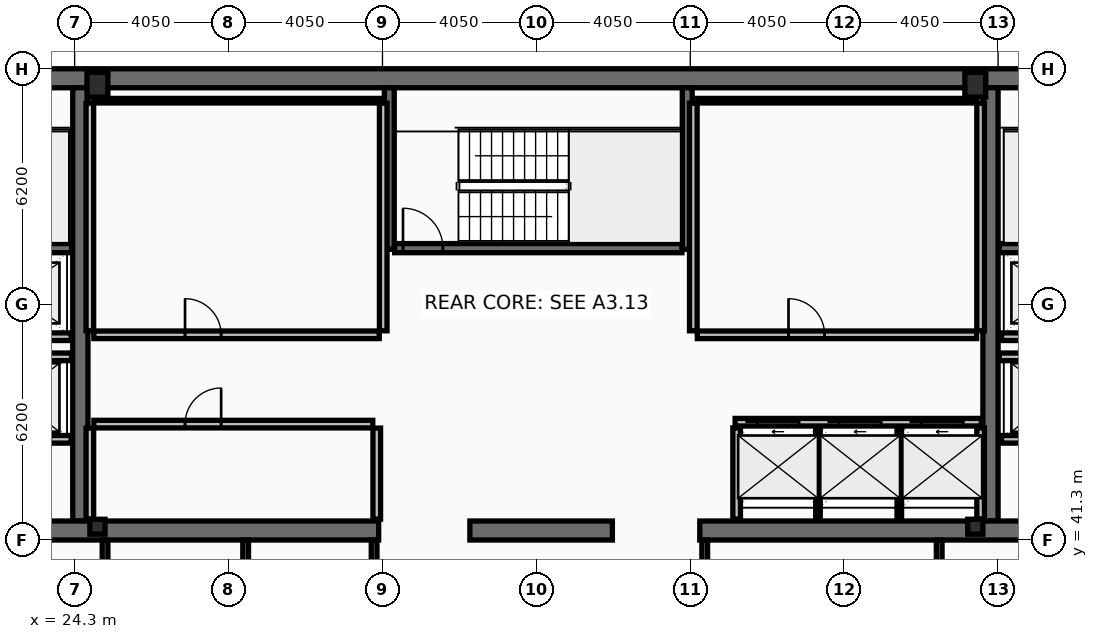
"""IFC4 building model, lengths in metres.
Left out: names, types, materials, properties, quantities, classifications, styles, units other than length and angle.
Written with IfcOpenShell. Run it as: python <this file> out.ifc"""

import sys

from ifc_helpers import new_model, si_unit, direction, frame, frame_2d, origin, origin_2d, place, context, subcontext, project, spatial, rectangle, hollow_rectangle, i_section, extrude, element, fill, save


model = new_model("IFC4")
c1 = context("Model", 3, precision=1e-05, world=origin(), true_north=direction((0.0, 1.0)))
c2 = subcontext(c1, "Body", "Model", "MODEL_VIEW")
j1 = project(units=[si_unit("LENGTHUNIT", "METRE"), si_unit("PLANEANGLEUNIT", "RADIAN")], contexts=[c1])
p1 = place(None, origin())
s1 = spatial("IfcSite", under=j1, at=p1, CompositionType="ELEMENT")
p2 = place(p1, origin())
s2 = spatial("IfcBuilding", under=s1, at=p2, CompositionType="ELEMENT")
p3 = place(p2, frame((0.0, 0.0, 321.8)))
s3 = spatial("IfcBuildingStorey", under=s2, at=p3, CompositionType="ELEMENT", Elevation=321.8)
p4 = place(p3, frame((16.2, 53.45, 0.0), z_axis=(0.0, 0.0, 1.0), x_axis=(1.0, 0.0, 0.0)))
e1 = element("IfcWall", 1, at=p4, inside=s3, PredefinedType="SHEAR", context=c2, shape_type="SweptSolid", body=[
    extrude(rectangle(XDim=40.5, YDim=0.5, at=frame_2d((20.25, 0.0))), origin(), (0.0, 0.0, 1.0), 3.44),
])
for number, where, z_axis, x_axis in (
    (2, (24.45, 41.8, 0.0), (0.0, 0.0, 1.0), (0.0, 1.0, 0.0)),
    (3, (48.4, 41.8, 0.0), (0.0, 0.0, 1.0), (0.0, 1.0, 0.0)),
):
    element("IfcWall", number, at=place(p3, frame(where, z_axis=z_axis, x_axis=x_axis)), inside=s3, PredefinedType="SHEAR", context=c2, shape_type="SweptSolid", body=[
        extrude(rectangle(XDim=11.4, YDim=0.4, at=frame_2d((5.7, 0.0))), origin(), (0.0, 0.0, 1.0), 3.44),
    ])
p5 = place(p3, frame((32.3, 41.55, 0.0), z_axis=(0.0, 0.0, 1.0), x_axis=(-1.0, 0.0, 0.0)))
e4 = element("IfcWall", 4, at=p5, inside=s3, PredefinedType="SHEAR", context=c2, shape_type="SweptSolid", body=[
    extrude(rectangle(XDim=11.45, YDim=0.5, at=frame_2d((5.725, 0.0))), origin(), (0.0, 0.0, 1.0), 3.44),
])
p6 = place(p3, frame((38.45, 41.55, 0.0), z_axis=(0.0, 0.0, 1.0), x_axis=(-1.0, 0.0, 0.0)))
e5 = element("IfcWall", 5, at=p6, inside=s3, PredefinedType="SHEAR", context=c2, shape_type="SweptSolid", body=[
    extrude(rectangle(XDim=3.75, YDim=0.5, at=frame_2d((1.875, 0.0))), origin(), (0.0, 0.0, 1.0), 3.44),
])
p7 = place(p3, frame((52.05, 41.55, 0.0), z_axis=(0.0, 0.0, 1.0), x_axis=(-1.0, 0.0, 0.0)))
e6 = element("IfcWall", 6, at=p7, inside=s3, PredefinedType="SHEAR", context=c2, shape_type="SweptSolid", body=[
    extrude(rectangle(XDim=11.3, YDim=0.5, at=frame_2d((5.65, 0.0))), origin(), (0.0, 0.0, 1.0), 3.44),
])
for number, where, z_axis, x_axis in (
    (7, (32.58, 48.95, 0.0), (0.0, 0.0, 1.0), (0.0, 1.0, 0.0)),
    (8, (40.42, 48.95, 0.0), (0.0, 0.0, 1.0), (0.0, 1.0, 0.0)),
):
    element("IfcWall", number, at=place(p3, frame(where, z_axis=z_axis, x_axis=x_axis)), inside=s3, PredefinedType="SHEAR", context=c2, shape_type="SweptSolid", body=[
        extrude(rectangle(XDim=4.25, YDim=0.26, at=frame_2d((2.125, 0.0))), origin(), (0.0, 0.0, 1.0), 3.44),
    ])
p8 = place(p3, frame((16.7, 48.98, 0.0), z_axis=(0.0, 0.0, 1.0), x_axis=(1.0, 0.0, 0.0)))
e9 = element("IfcWall", 9, at=p8, inside=s3, PredefinedType="SHEAR", context=c2, shape_type="SweptSolid", body=[
    extrude(rectangle(XDim=7.52, YDim=0.24, at=frame_2d((3.76, 0.0))), origin(), (0.0, 0.0, 1.0), 3.44),
])
p9 = place(p8, frame((0.22, 0.0, 0.0)))
e10 = element("IfcOpeningElement", 10, at=p9, cuts=e9, PredefinedType="OPENING", context=c2, shape_type="SweptSolid", body=[
    extrude(rectangle(XDim=1.05, YDim=2.15, at=frame_2d((0.525, 1.075))), frame((0.0, 0.13, 0.0), z_axis=(0.0, -1.0, 0.0), x_axis=(1.0, 0.0, 0.0)), (0.0, 0.0, 1.0), 0.26),
])
p10 = place(p3, frame((48.63, 48.98, 0.0), z_axis=(0.0, 0.0, 1.0), x_axis=(1.0, 0.0, 0.0)))
e11 = element("IfcWall", 11, at=p10, inside=s3, PredefinedType="SHEAR", context=c2, shape_type="SweptSolid", body=[
    extrude(rectangle(XDim=7.57, YDim=0.24, at=frame_2d((3.785, 0.0))), origin(), (0.0, 0.0, 1.0), 3.44),
])
p11 = place(p10, frame((6.3, 0.0, 0.0)))
e12 = element("IfcOpeningElement", 12, at=p11, cuts=e11, PredefinedType="OPENING", context=c2, shape_type="SweptSolid", body=[
    extrude(rectangle(XDim=1.05, YDim=2.15, at=frame_2d((0.525, 1.075))), frame((0.0, 0.13, 0.0), z_axis=(0.0, -1.0, 0.0), x_axis=(1.0, 0.0, 0.0)), (0.0, 0.0, 1.0), 0.26),
])
p12 = place(p3, frame((32.72, 48.98, 0.0), z_axis=(0.0, 0.0, 1.0), x_axis=(1.0, 0.0, 0.0)))
e13 = element("IfcWall", 13, at=p12, inside=s3, PredefinedType="SHEAR", context=c2, shape_type="SweptSolid", body=[
    extrude(rectangle(XDim=7.56, YDim=0.24, at=frame_2d((3.78, 0.0))), origin(), (0.0, 0.0, 1.0), 3.44),
])
p13 = place(p12, frame((0.22, 0.0, 0.0)))
e14 = element("IfcOpeningElement", 14, at=p13, cuts=e13, PredefinedType="OPENING", context=c2, shape_type="SweptSolid", body=[
    extrude(rectangle(XDim=1.05, YDim=2.15, at=frame_2d((0.525, 1.075))), frame((0.0, 0.13, 0.0), z_axis=(0.0, -1.0, 0.0), x_axis=(1.0, 0.0, 0.0)), (0.0, 0.0, 1.0), 0.26),
])
for number, where, z_axis, x_axis in (
    (15, (24.9, 53.28, 0.0), (0.0, 0.0, 1.0), (1.0, 0.0, 0.0)),
    (16, (48.0, 53.28, 0.0), (0.0, 0.0, 1.0), (1.0, 0.0, 0.0)),
):
    element("IfcColumn", number, at=place(p3, frame(where, z_axis=z_axis, x_axis=x_axis)), inside=s3, PredefinedType="COLUMN", context=c2, shape_type="SweptSolid", body=[
        extrude(hollow_rectangle(XDim=0.55, YDim=0.65, WallThickness=0.04, at=origin_2d()), origin(), (0.0, 0.0, 1.0), 3.6),
    ])
for number, where, z_axis, x_axis in (
    (17, (24.9, 41.65, 0.0), (0.0, 0.0, 1.0), (1.0, 0.0, 0.0)),
    (18, (48.0, 41.65, 0.0), (0.0, 0.0, 1.0), (1.0, 0.0, 0.0)),
):
    element("IfcColumn", number, at=place(p3, frame(where, z_axis=z_axis, x_axis=x_axis)), inside=s3, PredefinedType="COLUMN", context=c2, shape_type="SweptSolid", body=[
        extrude(i_section(OverallWidth=0.399, OverallDepth=0.393, WebThickness=0.023, FlangeThickness=0.037, at=origin_2d()), origin(), (0.0, 0.0, 1.0), 3.6),
    ])
p14 = place(p3, frame((41.68, 44.4, 0.0), z_axis=(0.0, 0.0, 1.0), x_axis=(1.0, 0.0, 0.0)))
e19 = element("IfcWall", 19, at=p14, inside=s3, PredefinedType="PARTITIONING", context=c2, shape_type="SweptSolid", body=[
    extrude(rectangle(XDim=6.48, YDim=0.2, at=frame_2d((3.24, 0.0))), origin(), (0.0, 0.0, 1.0), 3.44),
])
p15 = place(p14, frame((0.58, 0.0, 0.0)))
e20 = element("IfcOpeningElement", 20, at=p15, cuts=e19, PredefinedType="OPENING", context=c2, shape_type="SweptSolid", body=[
    extrude(rectangle(XDim=1.1, YDim=2.18, at=frame_2d((0.55, 1.09))), frame((0.0, 0.11, 0.0), z_axis=(0.0, -1.0, 0.0), x_axis=(1.0, 0.0, 0.0)), (0.0, 0.0, 1.0), 0.22),
])
p16 = place(p14, frame((2.74, 0.0, 0.0)))
e21 = element("IfcOpeningElement", 21, at=p16, cuts=e19, PredefinedType="OPENING", context=c2, shape_type="SweptSolid", body=[
    extrude(rectangle(XDim=1.1, YDim=2.18, at=frame_2d((0.55, 1.09))), frame((0.0, 0.11, 0.0), z_axis=(0.0, -1.0, 0.0), x_axis=(1.0, 0.0, 0.0)), (0.0, 0.0, 1.0), 0.22),
])
p17 = place(p14, frame((4.9, 0.0, 0.0)))
e22 = element("IfcOpeningElement", 22, at=p17, cuts=e19, PredefinedType="OPENING", context=c2, shape_type="SweptSolid", body=[
    extrude(rectangle(XDim=1.1, YDim=2.18, at=frame_2d((0.55, 1.09))), frame((0.0, 0.11, 0.0), z_axis=(0.0, -1.0, 0.0), x_axis=(1.0, 0.0, 0.0)), (0.0, 0.0, 1.0), 0.22),
])
p18 = place(p3, frame((51.61, 43.95, 0.0), z_axis=(0.0, 0.0, 1.0), x_axis=(-1.0, 0.0, 0.0)))
e23 = element("IfcWall", 23, at=p18, inside=s3, PredefinedType="PARTITIONING", context=c2, shape_type="SweptSolid", body=[
    extrude(rectangle(XDim=2.92, YDim=0.2, at=frame_2d((1.46, 0.0))), origin(), (0.0, 0.0, 1.0), 3.44),
])
p19 = place(p18, frame((0.81, 0.0, 0.0)))
e24 = element("IfcOpeningElement", 24, at=p19, cuts=e23, PredefinedType="OPENING", context=c2, shape_type="SweptSolid", body=[
    extrude(rectangle(XDim=1.3, YDim=2.18, at=frame_2d((0.65, 1.09))), frame((0.0, 0.11, 0.0), z_axis=(0.0, -1.0, 0.0), x_axis=(1.0, 0.0, 0.0)), (0.0, 0.0, 1.0), 0.22),
])
p20 = place(p3, frame((24.21, 43.95, 0.0), z_axis=(0.0, 0.0, 1.0), x_axis=(-1.0, 0.0, 0.0)))
e25 = element("IfcWall", 25, at=p20, inside=s3, PredefinedType="PARTITIONING", context=c2, shape_type="SweptSolid", body=[
    extrude(rectangle(XDim=2.97, YDim=0.2, at=frame_2d((1.485, 0.0))), origin(), (0.0, 0.0, 1.0), 3.44),
])
p21 = place(p20, frame((0.86, 0.0, 0.0)))
e26 = element("IfcOpeningElement", 26, at=p21, cuts=e25, PredefinedType="OPENING", context=c2, shape_type="SweptSolid", body=[
    extrude(rectangle(XDim=1.3, YDim=2.18, at=frame_2d((0.65, 1.09))), frame((0.0, 0.11, 0.0), z_axis=(0.0, -1.0, 0.0), x_axis=(1.0, 0.0, 0.0)), (0.0, 0.0, 1.0), 0.22),
])
p22 = place(p3, frame((51.61, 46.65, 0.0), z_axis=(0.0, 0.0, 1.0), x_axis=(-1.0, 0.0, 0.0)))
e27 = element("IfcWall", 27, at=p22, inside=s3, PredefinedType="PARTITIONING", context=c2, shape_type="SweptSolid", body=[
    extrude(rectangle(XDim=2.92, YDim=0.2, at=frame_2d((1.46, 0.0))), origin(), (0.0, 0.0, 1.0), 3.44),
])
p23 = place(p22, frame((0.86, 0.0, 0.0)))
e28 = element("IfcOpeningElement", 28, at=p23, cuts=e27, PredefinedType="OPENING", context=c2, shape_type="SweptSolid", body=[
    extrude(rectangle(XDim=1.2, YDim=2.18, at=frame_2d((0.6, 1.09))), frame((0.0, 0.11, 0.0), z_axis=(0.0, -1.0, 0.0), x_axis=(1.0, 0.0, 0.0)), (0.0, 0.0, 1.0), 0.22),
])
p24 = place(p3, frame((24.21, 46.65, 0.0), z_axis=(0.0, 0.0, 1.0), x_axis=(-1.0, 0.0, 0.0)))
e29 = element("IfcWall", 29, at=p24, inside=s3, PredefinedType="PARTITIONING", context=c2, shape_type="SweptSolid", body=[
    extrude(rectangle(XDim=2.97, YDim=0.2, at=frame_2d((1.485, 0.0))), origin(), (0.0, 0.0, 1.0), 3.44),
])
p25 = place(p24, frame((0.91, 0.0, 0.0)))
e30 = element("IfcOpeningElement", 30, at=p25, cuts=e29, PredefinedType="OPENING", context=c2, shape_type="SweptSolid", body=[
    extrude(rectangle(XDim=1.2, YDim=2.18, at=frame_2d((0.6, 1.09))), frame((0.0, 0.11, 0.0), z_axis=(0.0, -1.0, 0.0), x_axis=(1.0, 0.0, 0.0)), (0.0, 0.0, 1.0), 0.22),
])
p26 = place(p3, frame((21.2, 46.12, 0.0), z_axis=(0.0, 0.0, 1.0), x_axis=(1.0, 0.0, 0.0)))
e31 = element("IfcWall", 31, at=p26, inside=s3, PredefinedType="PARTITIONING", context=c2, shape_type="SweptSolid", body=[
    extrude(rectangle(XDim=3.02, YDim=0.2, at=frame_2d((1.51, 0.0))), origin(), (0.0, 0.0, 1.0), 3.44),
])
p27 = place(p3, frame((48.63, 46.12, 0.0), z_axis=(0.0, 0.0, 1.0), x_axis=(1.0, 0.0, 0.0)))
e32 = element("IfcWall", 32, at=p27, inside=s3, PredefinedType="PARTITIONING", context=c2, shape_type="SweptSolid", body=[
    extrude(rectangle(XDim=3.07, YDim=0.2, at=frame_2d((1.535, 0.0))), origin(), (0.0, 0.0, 1.0), 3.44),
])
for number, where, z_axis, x_axis in (
    (33, (24.7, 46.805, 0.0), (0.0, 0.0, 1.0), (0.0, 1.0, 0.0)),
    (34, (32.42, 46.805, 0.0), (0.0, 0.0, 1.0), (0.0, 1.0, 0.0)),
):
    element("IfcWall", number, at=place(p3, frame(where, z_axis=z_axis, x_axis=x_axis)), inside=s3, PredefinedType="PARTITIONING", context=c2, shape_type="SweptSolid", body=[
        extrude(rectangle(XDim=5.99, YDim=0.2, at=frame_2d((2.995, 0.0))), origin(), (0.0, 0.0, 1.0), 3.44),
    ])
p28 = place(p3, frame((24.805, 52.86, 0.0), z_axis=(0.0, 0.0, 1.0), x_axis=(1.0, 0.0, 0.0)))
e35 = element("IfcWall", 35, at=p28, inside=s3, PredefinedType="PARTITIONING", context=c2, shape_type="SweptSolid", body=[
    extrude(rectangle(XDim=7.51, YDim=0.12, at=frame_2d((3.755, 0.0))), origin(), (0.0, 0.0, 1.0), 3.44),
])
p29 = place(p3, frame((24.805, 46.7, 0.0), z_axis=(0.0, 0.0, 1.0), x_axis=(1.0, 0.0, 0.0)))
e36 = element("IfcWall", 36, at=p29, inside=s3, PredefinedType="PARTITIONING", context=c2, shape_type="SweptSolid", body=[
    extrude(rectangle(XDim=7.51, YDim=0.2, at=frame_2d((3.755, 0.0))), origin(), (0.0, 0.0, 1.0), 3.44),
])
p30 = place(p29, frame((2.4, 0.0, 0.0)))
e37 = element("IfcOpeningElement", 37, at=p30, cuts=e36, PredefinedType="OPENING", context=c2, shape_type="SweptSolid", body=[
    extrude(rectangle(XDim=0.95, YDim=2.1, at=frame_2d((0.475, 1.05))), frame((0.0, 0.11, 0.0), z_axis=(0.0, -1.0, 0.0), x_axis=(1.0, 0.0, 0.0)), (0.0, 0.0, 1.0), 0.22),
])
for number, where, z_axis, x_axis in (
    (38, (24.7, 41.85, 0.0), (0.0, 0.0, 1.0), (0.0, 1.0, 0.0)),
    (39, (32.25, 41.85, 0.0), (0.0, 0.0, 1.0), (0.0, 1.0, 0.0)),
):
    element("IfcWall", number, at=place(p3, frame(where, z_axis=z_axis, x_axis=x_axis)), inside=s3, PredefinedType="PARTITIONING", context=c2, shape_type="SweptSolid", body=[
        extrude(rectangle(XDim=2.395, YDim=0.2, at=frame_2d((1.198, 0.0))), origin(), (0.0, 0.0, 1.0), 3.44),
    ])
p31 = place(p3, frame((24.805, 44.35, 0.0), z_axis=(0.0, 0.0, 1.0), x_axis=(1.0, 0.0, 0.0)))
e40 = element("IfcWall", 40, at=p31, inside=s3, PredefinedType="PARTITIONING", context=c2, shape_type="SweptSolid", body=[
    extrude(rectangle(XDim=7.34, YDim=0.2, at=frame_2d((3.67, 0.0))), origin(), (0.0, 0.0, 1.0), 3.44),
])
p32 = place(p31, frame((2.4, 0.0, 0.0)))
e41 = element("IfcOpeningElement", 41, at=p32, cuts=e40, PredefinedType="OPENING", context=c2, shape_type="SweptSolid", body=[
    extrude(rectangle(XDim=0.95, YDim=2.1, at=frame_2d((0.475, 1.05))), frame((0.0, 0.11, 0.0), z_axis=(0.0, -1.0, 0.0), x_axis=(1.0, 0.0, 0.0)), (0.0, 0.0, 1.0), 0.22),
])
for number, where, z_axis, x_axis in (
    (42, (40.58, 46.805, 0.0), (0.0, 0.0, 1.0), (0.0, 1.0, 0.0)),
    (43, (48.14, 46.805, 0.0), (0.0, 0.0, 1.0), (0.0, 1.0, 0.0)),
):
    element("IfcWall", number, at=place(p3, frame(where, z_axis=z_axis, x_axis=x_axis)), inside=s3, PredefinedType="PARTITIONING", context=c2, shape_type="SweptSolid", body=[
        extrude(rectangle(XDim=5.99, YDim=0.2, at=frame_2d((2.995, 0.0))), origin(), (0.0, 0.0, 1.0), 3.44),
    ])
p33 = place(p3, frame((40.685, 52.86, 0.0), z_axis=(0.0, 0.0, 1.0), x_axis=(1.0, 0.0, 0.0)))
e44 = element("IfcWall", 44, at=p33, inside=s3, PredefinedType="PARTITIONING", context=c2, shape_type="SweptSolid", body=[
    extrude(rectangle(XDim=7.35, YDim=0.12, at=frame_2d((3.675, 0.0))), origin(), (0.0, 0.0, 1.0), 3.44),
])
p34 = place(p3, frame((40.685, 46.7, 0.0), z_axis=(0.0, 0.0, 1.0), x_axis=(1.0, 0.0, 0.0)))
e45 = element("IfcWall", 45, at=p34, inside=s3, PredefinedType="PARTITIONING", context=c2, shape_type="SweptSolid", body=[
    extrude(rectangle(XDim=7.35, YDim=0.2, at=frame_2d((3.675, 0.0))), origin(), (0.0, 0.0, 1.0), 3.44),
])
p35 = place(p34, frame((2.4, 0.0, 0.0)))
e46 = element("IfcOpeningElement", 46, at=p35, cuts=e45, PredefinedType="OPENING", context=c2, shape_type="SweptSolid", body=[
    extrude(rectangle(XDim=0.95, YDim=2.1, at=frame_2d((0.475, 1.05))), frame((0.0, 0.11, 0.0), z_axis=(0.0, -1.0, 0.0), x_axis=(1.0, 0.0, 0.0)), (0.0, 0.0, 1.0), 0.22),
])
for number, where, z_axis, x_axis in (
    (47, (41.72, 41.85, 0.0), (0.0, 0.0, 1.0), (0.0, 1.0, 0.0)),
    (48, (48.14, 41.85, 0.0), (0.0, 0.0, 1.0), (0.0, 1.0, 0.0)),
):
    element("IfcWall", number, at=place(p3, frame(where, z_axis=z_axis, x_axis=x_axis)), inside=s3, PredefinedType="PARTITIONING", context=c2, shape_type="SweptSolid", body=[
        extrude(rectangle(XDim=2.4, YDim=0.2, at=frame_2d((1.2, 0.0))), origin(), (0.0, 0.0, 1.0), 3.44),
    ])
for number, where, z_axis, x_axis in (
    (49, (43.86, 41.85, 0.0), (0.0, 0.0, 1.0), (0.0, 1.0, 0.0)),
    (50, (46.0, 41.85, 0.0), (0.0, 0.0, 1.0), (0.0, 1.0, 0.0)),
):
    element("IfcWall", number, at=place(p3, frame(where, z_axis=z_axis, x_axis=x_axis)), inside=s3, PredefinedType="PARTITIONING", context=c2, shape_type="SweptSolid", body=[
        extrude(rectangle(XDim=2.4, YDim=0.12, at=frame_2d((1.2, 0.0))), origin(), (0.0, 0.0, 1.0), 3.44),
    ])
p36 = place(p3, frame((25.1, 38.28, 0.0), z_axis=(0.0, 0.0, 1.0), x_axis=(0.0, 1.0, 0.0)))
e51 = element("IfcWall", 51, at=p36, inside=s3, PredefinedType="PARTITIONING", context=c2, shape_type="SweptSolid", body=[
    extrude(rectangle(XDim=3.02, YDim=0.15, at=frame_2d((1.51, 0.0))), origin(), (0.0, 0.0, 1.0), 2.83),
])
for number, where, z_axis, x_axis in (
    (52, (28.8, 38.28, 0.0), (0.0, 0.0, 1.0), (0.0, 1.0, 0.0)),
    (53, (32.18, 38.28, 0.0), (0.0, 0.0, 1.0), (0.0, 1.0, 0.0)),
    (54, (40.88, 38.28, 0.0), (0.0, 0.0, 1.0), (0.0, 1.0, 0.0)),
    (55, (47.05, 38.28, 0.0), (0.0, 0.0, 1.0), (0.0, 1.0, 0.0)),
):
    element("IfcWall", number, at=place(p3, frame(where, z_axis=z_axis, x_axis=x_axis)), inside=s3, PredefinedType="PARTITIONING", context=c2, shape_type="SweptSolid", body=[
        extrude(rectangle(XDim=3.02, YDim=0.15, at=frame_2d((1.51, 0.0))), origin(), (0.0, 0.0, 1.0), 3.44),
    ])
p37 = place(p13, origin())
e56 = element("IfcDoor", 56, at=p37, inside=s3, OperationType="SINGLE_SWING_LEFT", PredefinedType="DOOR", context=c2, shape_type="SweptSolid", body=[
    extrude(rectangle(XDim=1.05, YDim=2.15, at=frame_2d((0.525, 1.075))), frame((0.0, 0.025, 0.0), z_axis=(0.0, -1.0, 0.0), x_axis=(1.0, 0.0, 0.0)), (0.0, 0.0, 1.0), 0.05),
])
fill(e14, e56)
p38 = place(p15, origin())
e57 = element("IfcDoor", 57, at=p38, inside=s3, OperationType="SLIDING_TO_LEFT", PredefinedType="DOOR", context=c2, shape_type="SweptSolid", body=[
    extrude(rectangle(XDim=1.1, YDim=2.18, at=frame_2d((0.55, 1.09))), frame((0.0, 0.025, 0.0), z_axis=(0.0, -1.0, 0.0), x_axis=(1.0, 0.0, 0.0)), (0.0, 0.0, 1.0), 0.05),
])
fill(e20, e57)
p39 = place(p16, origin())
e58 = element("IfcDoor", 58, at=p39, inside=s3, OperationType="SLIDING_TO_LEFT", PredefinedType="DOOR", context=c2, shape_type="SweptSolid", body=[
    extrude(rectangle(XDim=1.1, YDim=2.18, at=frame_2d((0.55, 1.09))), frame((0.0, 0.025, 0.0), z_axis=(0.0, -1.0, 0.0), x_axis=(1.0, 0.0, 0.0)), (0.0, 0.0, 1.0), 0.05),
])
fill(e21, e58)
p40 = place(p17, origin())
e59 = element("IfcDoor", 59, at=p40, inside=s3, OperationType="SLIDING_TO_LEFT", PredefinedType="DOOR", context=c2, shape_type="SweptSolid", body=[
    extrude(rectangle(XDim=1.1, YDim=2.18, at=frame_2d((0.55, 1.09))), frame((0.0, 0.025, 0.0), z_axis=(0.0, -1.0, 0.0), x_axis=(1.0, 0.0, 0.0)), (0.0, 0.0, 1.0), 0.05),
])
fill(e22, e59)
p41 = place(p30, origin())
e60 = element("IfcDoor", 60, at=p41, inside=s3, OperationType="SINGLE_SWING_LEFT", PredefinedType="DOOR", context=c2, shape_type="SweptSolid", body=[
    extrude(rectangle(XDim=0.95, YDim=2.1, at=frame_2d((0.475, 1.05))), frame((0.0, 0.025, 0.0), z_axis=(0.0, -1.0, 0.0), x_axis=(1.0, 0.0, 0.0)), (0.0, 0.0, 1.0), 0.05),
])
fill(e37, e60)
p42 = place(p32, origin())
e61 = element("IfcDoor", 61, at=p42, inside=s3, OperationType="SINGLE_SWING_RIGHT", PredefinedType="DOOR", context=c2, shape_type="SweptSolid", body=[
    extrude(rectangle(XDim=0.95, YDim=2.1, at=frame_2d((0.475, 1.05))), frame((0.0, 0.025, 0.0), z_axis=(0.0, -1.0, 0.0), x_axis=(1.0, 0.0, 0.0)), (0.0, 0.0, 1.0), 0.05),
])
fill(e41, e61)
p43 = place(p35, origin())
e62 = element("IfcDoor", 62, at=p43, inside=s3, OperationType="SINGLE_SWING_LEFT", PredefinedType="DOOR", context=c2, shape_type="SweptSolid", body=[
    extrude(rectangle(XDim=0.95, YDim=2.1, at=frame_2d((0.475, 1.05))), frame((0.0, 0.025, 0.0), z_axis=(0.0, -1.0, 0.0), x_axis=(1.0, 0.0, 0.0)), (0.0, 0.0, 1.0), 0.05),
])
fill(e46, e62)
save(model, sys.argv[1])
